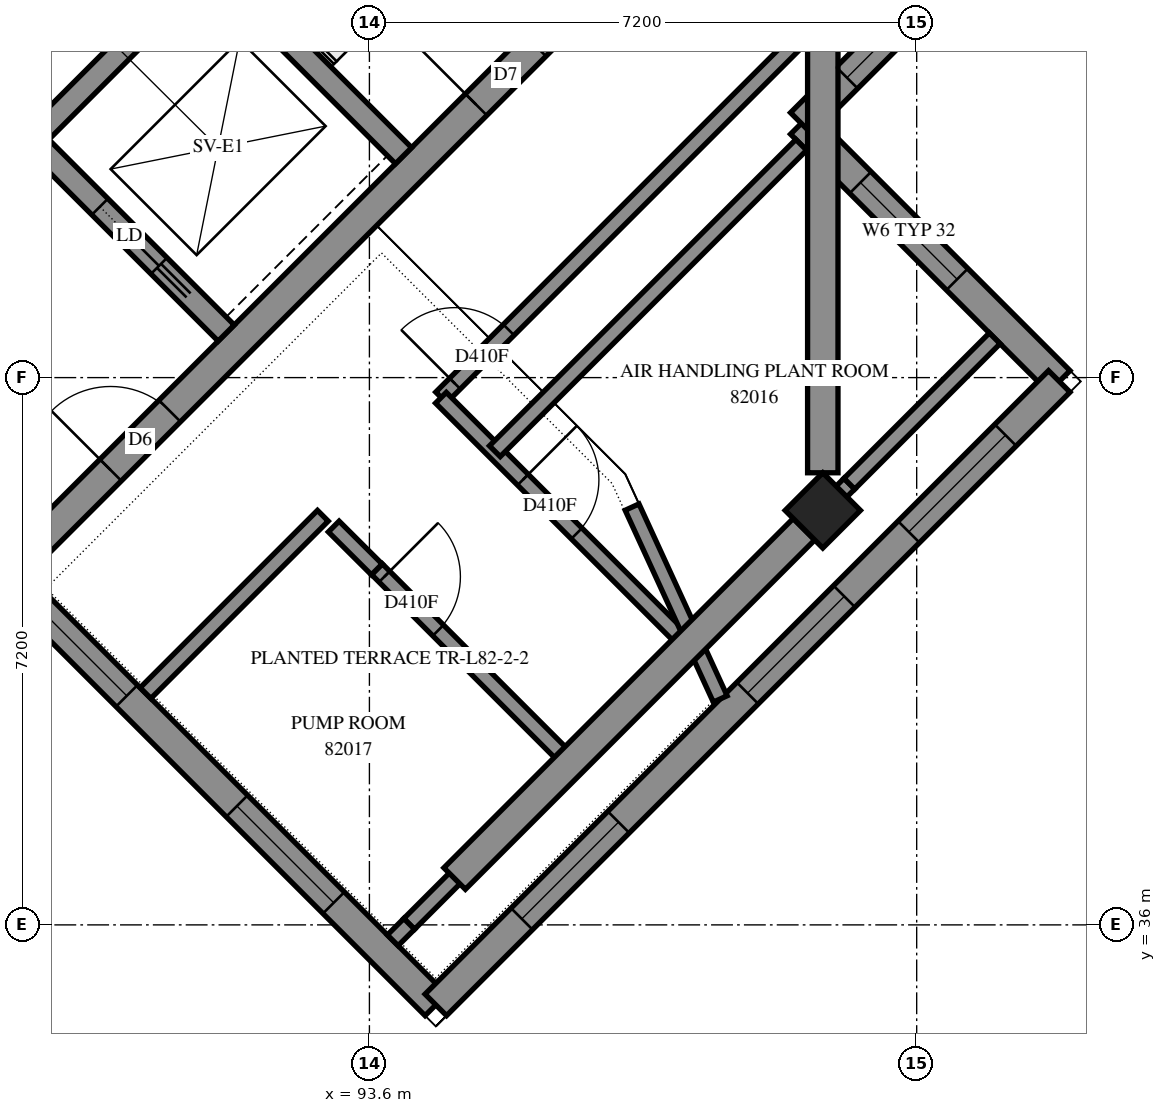
"""IFC4 building model, lengths in metres.
Left out: names, types, materials, properties, quantities, classifications, styles, units other than length and angle.
Written with IfcOpenShell. Run it as: python <this file> out.ifc"""

import sys

from ifc_helpers import new_model, si_unit, direction, frame, frame_2d, origin, origin_2d, place, context, subcontext, project, spatial, polyline, rectangle, outline, extrude, element, fill, save


model = new_model("IFC4")
c1 = context("Model", 3, precision=1e-05, world=origin(), true_north=direction((0.0, 1.0)))
c2 = subcontext(c1, "Body", "Model", "MODEL_VIEW")
j1 = project(units=[si_unit("LENGTHUNIT", "METRE"), si_unit("PLANEANGLEUNIT", "RADIAN")], contexts=[c1])
p1 = place(None, origin())
s1 = spatial("IfcSite", under=j1, at=p1, CompositionType="ELEMENT")
p2 = place(p1, origin())
s2 = spatial("IfcBuilding", under=s1, at=p2, CompositionType="ELEMENT")
p3 = place(p2, frame((0.0, 0.0, 302.0)))
s3 = spatial("IfcBuildingStorey", under=s2, at=p3, CompositionType="ELEMENT", Elevation=302.0)
p4 = place(p3, frame((99.565, 41.453, 0.0), z_axis=(0.0, 0.0, 1.0), x_axis=(0.7071067812, -0.7071067812, 0.0)))
e1 = element("IfcColumn", 1, at=p4, inside=s3, PredefinedType="COLUMN", context=c2, shape_type="SweptSolid", body=[
    extrude(rectangle(XDim=0.7, YDim=0.7, at=origin_2d()), origin(), (0.0, 0.0, 1.0), 3.5),
])
p5 = place(p3, frame((89.17, 40.958, -0.3), z_axis=(0.0, 0.0, 1.0), x_axis=(0.7071067812, 0.7071067812, 0.0)))
e2 = element("IfcWall", 2, at=p5, inside=s3, PredefinedType="SHEAR", context=c2, shape_type="SweptSolid", body=[
    extrude(outline(polyline([(0.0, 0.0), (11.3, 0.0), (11.3, 3.1), (0.0, 3.1), (0.0, 0.0)])), frame((0.0, 0.2, 0.0), z_axis=(0.0, -1.0, 0.0), x_axis=(1.0, 0.0, 0.0)), (0.0, 0.0, 1.0), 0.4),
])
p6 = place(p5, frame((1.45, 0.0, 0.3)))
e3 = element("IfcOpeningElement", 3, at=p6, cuts=e2, PredefinedType="OPENING", context=c2, shape_type="SweptSolid", body=[
    extrude(rectangle(XDim=1.1, YDim=2.1, at=frame_2d((0.55, 1.05))), frame((0.0, 0.21, 0.0), z_axis=(0.0, -1.0, 0.0), x_axis=(1.0, 0.0, 0.0)), (0.0, 0.0, 1.0), 0.42),
])
p7 = place(p5, frame((8.25, 0.0, 0.3)))
e4 = element("IfcOpeningElement", 4, at=p7, cuts=e2, PredefinedType="OPENING", context=c2, shape_type="SweptSolid", body=[
    extrude(rectangle(XDim=1.1, YDim=2.1, at=frame_2d((0.55, 1.05))), frame((0.0, 0.21, 0.0), z_axis=(0.0, -1.0, 0.0), x_axis=(1.0, 0.0, 0.0)), (0.0, 0.0, 1.0), 0.42),
])
p8 = place(p3, frame((89.17, 46.332, 0.0), z_axis=(0.0, 0.0, 1.0), x_axis=(0.7071067812, 0.7071067812, 0.0)))
e5 = element("IfcWall", 5, at=p8, inside=s3, PredefinedType="SOLIDWALL", context=c2, shape_type="SweptSolid", body=[
    extrude(outline(polyline([(0.0, 0.0), (3.3, 0.0), (3.3, 3.5), (0.0, 3.5), (0.0, 0.0)])), frame((0.0, 0.15, 0.0), z_axis=(0.0, -1.0, 0.0), x_axis=(1.0, 0.0, 0.0)), (0.0, 0.0, 1.0), 0.3),
])
p9 = place(p3, frame((81.534, 53.969, 0.0), z_axis=(0.0, 0.0, 1.0), x_axis=(0.707103309, -0.7071102534, 0.0)))
e6 = element("IfcWall", 6, at=p9, inside=s3, PredefinedType="SOLIDWALL", context=c2, shape_type="SweptSolid", body=[
    extrude(outline(polyline([(0.0, 0.0), (14.4, 0.0), (14.4, 3.5), (0.0, 3.5), (0.0, 0.0)])), frame((0.0, 0.15, 0.0), z_axis=(0.0, -1.0, 0.0), x_axis=(1.0, 0.0, 0.0)), (0.0, 0.0, 1.0), 0.3),
])
p10 = place(p9, frame((12.05, 0.0, 0.0)))
e7 = element("IfcOpeningElement", 7, at=p10, cuts=e6, PredefinedType="OPENING", context=c2, shape_type="SweptSolid", body=[
    extrude(rectangle(XDim=1.1, YDim=2.1, at=frame_2d((0.55, 1.05))), frame((0.0, 0.16, 0.0), z_axis=(0.0, -1.0, 0.0), x_axis=(1.0, 0.0, 0.0)), (0.0, 0.0, 1.0), 0.32),
])
p11 = place(p3, frame((88.958, 51.211, 0.0), z_axis=(0.0, 0.0, 1.0), x_axis=(0.7070998367, -0.7071137256, 0.0)))
e8 = element("IfcWall", 8, at=p11, inside=s3, PredefinedType="SOLIDWALL", context=c2, shape_type="SweptSolid", body=[
    extrude(outline(polyline([(0.0, 0.0), (7.2, 0.0), (7.2, 3.5), (0.0, 3.5), (0.0, 0.0)])), frame((0.0, 0.15, 0.0), z_axis=(0.0, -1.0, 0.0), x_axis=(1.0, 0.0, 0.0)), (0.0, 0.0, 1.0), 0.3),
])
p12 = place(p3, frame((102.676, 43.15, 0.0), z_axis=(0.0, 0.0, 1.0), x_axis=(-0.7070963646, 0.7071171977, 0.0)))
e9 = element("IfcWall", 9, at=p12, inside=s3, PredefinedType="SOLIDWALL", context=c2, shape_type="SweptSolid", body=[
    extrude(outline(polyline([(-0.2, -0.2), (4.6, -0.2), (5.0, 0.2), (0.2, 0.2), (-0.2, -0.2)])), origin(), (0.0, 0.0, 1.0), 3.5),
])
p13 = place(p12, frame((1.9, 0.0, 0.7)))
e10 = element("IfcOpeningElement", 10, at=p13, cuts=e9, PredefinedType="OPENING", context=c2, shape_type="SweptSolid", body=[
    extrude(rectangle(XDim=1.8, YDim=2.2, at=frame_2d((0.9, 1.1))), frame((0.0, 0.21, 0.0), z_axis=(0.0, -1.0, 0.0), x_axis=(1.0, 0.0, 0.0)), (0.0, 0.0, 1.0), 0.42),
])
p14 = place(p3, frame((99.282, 46.544, 0.0), z_axis=(0.0, 0.0, 1.0), x_axis=(0.7071067812, 0.7071067812, 0.0)))
e11 = element("IfcWall", 11, at=p14, inside=s3, PredefinedType="SOLIDWALL", context=c2, shape_type="SweptSolid", body=[
    extrude(outline(polyline([(0.2, -0.2), (6.23, -0.2), (5.657, 0.2), (-0.2, 0.2), (0.2, -0.2)])), origin(), (0.0, 0.0, 1.0), 3.5),
])
p15 = place(p14, frame((0.85, 0.0, 0.7)))
e12 = element("IfcOpeningElement", 12, at=p15, cuts=e11, PredefinedType="OPENING", context=c2, shape_type="SweptSolid", body=[
    extrude(rectangle(XDim=1.8, YDim=2.2, at=frame_2d((0.9, 1.1))), frame((0.0, 0.21, 0.0), z_axis=(0.0, -1.0, 0.0), x_axis=(1.0, 0.0, 0.0)), (0.0, 0.0, 1.0), 0.42),
])
p16 = place(p3, frame((72.821, 56.6, 0.0), z_axis=(0.0, 0.0, 1.0), x_axis=(0.7071067812, -0.7071067812, 0.0)))
e13 = element("IfcWall", 13, at=p16, inside=s3, PredefinedType="SOLIDWALL", context=c2, shape_type="SweptSolid", body=[
    extrude(outline(polyline([(0.083, -0.2), (30.821, -0.2), (30.421, 0.2), (-0.083, 0.2), (0.083, -0.2)])), origin(), (0.0, 0.0, 1.0), 3.5),
])
p17 = place(p16, frame((2.421, 0.0, 0.7)))
e14 = element("IfcOpeningElement", 14, at=p17, cuts=e13, PredefinedType="OPENING", context=c2, shape_type="SweptSolid", body=[
    extrude(rectangle(XDim=1.8, YDim=2.2, at=frame_2d((0.9, 1.1))), frame((0.0, 0.21, 0.0), z_axis=(0.0, -1.0, 0.0), x_axis=(1.0, 0.0, 0.0)), (0.0, 0.0, 1.0), 0.42),
])
p18 = place(p16, frame((5.521, 0.0, 0.7)))
e15 = element("IfcOpeningElement", 15, at=p18, cuts=e13, PredefinedType="OPENING", context=c2, shape_type="SweptSolid", body=[
    extrude(rectangle(XDim=1.8, YDim=2.2, at=frame_2d((0.9, 1.1))), frame((0.0, 0.21, 0.0), z_axis=(0.0, -1.0, 0.0), x_axis=(1.0, 0.0, 0.0)), (0.0, 0.0, 1.0), 0.42),
])
p19 = place(p16, frame((8.921, 0.0, 0.7)))
e16 = element("IfcOpeningElement", 16, at=p19, cuts=e13, PredefinedType="OPENING", context=c2, shape_type="SweptSolid", body=[
    extrude(rectangle(XDim=1.8, YDim=2.2, at=frame_2d((0.9, 1.1))), frame((0.0, 0.21, 0.0), z_axis=(0.0, -1.0, 0.0), x_axis=(1.0, 0.0, 0.0)), (0.0, 0.0, 1.0), 0.42),
])
p20 = place(p16, frame((12.521, 0.0, 0.7)))
e17 = element("IfcOpeningElement", 17, at=p20, cuts=e13, PredefinedType="OPENING", context=c2, shape_type="SweptSolid", body=[
    extrude(rectangle(XDim=1.8, YDim=2.2, at=frame_2d((0.9, 1.1))), frame((0.0, 0.21, 0.0), z_axis=(0.0, -1.0, 0.0), x_axis=(1.0, 0.0, 0.0)), (0.0, 0.0, 1.0), 0.42),
])
p21 = place(p16, frame((16.121, 0.0, 0.7)))
e18 = element("IfcOpeningElement", 18, at=p21, cuts=e13, PredefinedType="OPENING", context=c2, shape_type="SweptSolid", body=[
    extrude(rectangle(XDim=1.8, YDim=2.2, at=frame_2d((0.9, 1.1))), frame((0.0, 0.21, 0.0), z_axis=(0.0, -1.0, 0.0), x_axis=(1.0, 0.0, 0.0)), (0.0, 0.0, 1.0), 0.42),
])
p22 = place(p16, frame((19.721, 0.0, 0.7)))
e19 = element("IfcOpeningElement", 19, at=p22, cuts=e13, PredefinedType="OPENING", context=c2, shape_type="SweptSolid", body=[
    extrude(rectangle(XDim=1.8, YDim=2.2, at=frame_2d((0.9, 1.1))), frame((0.0, 0.21, 0.0), z_axis=(0.0, -1.0, 0.0), x_axis=(1.0, 0.0, 0.0)), (0.0, 0.0, 1.0), 0.42),
])
p23 = place(p16, frame((23.071, 0.0, 0.7)))
e20 = element("IfcOpeningElement", 20, at=p23, cuts=e13, PredefinedType="OPENING", context=c2, shape_type="SweptSolid", body=[
    extrude(rectangle(XDim=1.8, YDim=2.2, at=frame_2d((0.9, 1.1))), frame((0.0, 0.21, 0.0), z_axis=(0.0, -1.0, 0.0), x_axis=(1.0, 0.0, 0.0)), (0.0, 0.0, 1.0), 0.42),
])
p24 = place(p16, frame((26.921, 0.0, 0.7)))
e21 = element("IfcOpeningElement", 21, at=p24, cuts=e13, PredefinedType="OPENING", context=c2, shape_type="SweptSolid", body=[
    extrude(rectangle(XDim=1.8, YDim=2.2, at=frame_2d((0.9, 1.1))), frame((0.0, 0.21, 0.0), z_axis=(0.0, -1.0, 0.0), x_axis=(1.0, 0.0, 0.0)), (0.0, 0.0, 1.0), 0.42),
])
p25 = place(p3, frame((94.474, 34.948, 0.0), z_axis=(0.0, 0.0, 1.0), x_axis=(0.7071110915, 0.7071024708, 0.0)))
e22 = element("IfcWall", 22, at=p25, inside=s3, PredefinedType="SOLIDWALL", context=c2, shape_type="SweptSolid", body=[
    extrude(outline(polyline([(-0.2, -0.2), (11.8, -0.2), (11.4, 0.2), (0.2, 0.2), (-0.2, -0.2)])), origin(), (0.0, 0.0, 1.0), 3.5),
])
p26 = place(p25, frame((1.6, 0.0, 0.7)))
e23 = element("IfcOpeningElement", 23, at=p26, cuts=e22, PredefinedType="OPENING", context=c2, shape_type="SweptSolid", body=[
    extrude(rectangle(XDim=1.8, YDim=2.2, at=frame_2d((0.9, 1.1))), frame((0.0, 0.21, 0.0), z_axis=(0.0, -1.0, 0.0), x_axis=(1.0, 0.0, 0.0)), (0.0, 0.0, 1.0), 0.42),
])
p27 = place(p25, frame((5.8, 0.0, 0.7)))
e24 = element("IfcOpeningElement", 24, at=p27, cuts=e22, PredefinedType="OPENING", context=c2, shape_type="SweptSolid", body=[
    extrude(rectangle(XDim=1.8, YDim=2.2, at=frame_2d((0.9, 1.1))), frame((0.0, 0.21, 0.0), z_axis=(0.0, -1.0, 0.0), x_axis=(1.0, 0.0, 0.0)), (0.0, 0.0, 1.0), 0.42),
])
p28 = place(p25, frame((8.8, 0.0, 0.7)))
e25 = element("IfcOpeningElement", 25, at=p28, cuts=e22, PredefinedType="OPENING", context=c2, shape_type="SweptSolid", body=[
    extrude(rectangle(XDim=1.8, YDim=2.2, at=frame_2d((0.9, 1.1))), frame((0.0, 0.21, 0.0), z_axis=(0.0, -1.0, 0.0), x_axis=(1.0, 0.0, 0.0)), (0.0, 0.0, 1.0), 0.42),
])
p29 = place(p3, frame((94.543, 42.939, 0.0), z_axis=(0.0, 0.0, 1.0), x_axis=(0.7071067812, 0.7071067812, 0.0)))
e26 = element("IfcWall", 26, at=p29, inside=s3, PredefinedType="PARTITIONING", context=c2, shape_type="SweptSolid", body=[
    extrude(rectangle(XDim=8.7, YDim=0.2, at=frame_2d((4.35, 0.0))), origin(), (0.0, 0.0, 1.0), 3.5),
])
p30 = place(p29, frame((0.258, 0.0, 0.0)))
e27 = element("IfcOpeningElement", 27, at=p30, cuts=e26, PredefinedType="OPENING", context=c2, shape_type="SweptSolid", body=[
    extrude(rectangle(XDim=1.0, YDim=2.1, at=frame_2d((0.5, 1.05))), frame((0.0, 0.11, 0.0), z_axis=(0.0, -1.0, 0.0), x_axis=(1.0, 0.0, 0.0)), (0.0, 0.0, 1.0), 0.22),
])
p31 = place(p3, frame((94.541, 42.935, 0.0), z_axis=(0.0, 0.0, 1.0), x_axis=(0.7071067812, -0.7071067812, 0.0)))
e28 = element("IfcWall", 28, at=p31, inside=s3, PredefinedType="PARTITIONING", context=c2, shape_type="SweptSolid", body=[
    extrude(rectangle(XDim=4.599, YDim=0.2, at=frame_2d((2.3, 0.0))), origin(), (0.0, 0.0, 1.0), 3.5),
])
p32 = place(p31, frame((1.525, 0.0, 0.0)))
e29 = element("IfcOpeningElement", 29, at=p32, cuts=e28, PredefinedType="OPENING", context=c2, shape_type="SweptSolid", body=[
    extrude(rectangle(XDim=1.0, YDim=2.1, at=frame_2d((0.5, 1.05))), frame((0.0, 0.11, 0.0), z_axis=(0.0, -1.0, 0.0), x_axis=(1.0, 0.0, 0.0)), (0.0, 0.0, 1.0), 0.22),
])
p33 = place(p3, frame((93.699, 40.679, 0.0), z_axis=(0.0, 0.0, 1.0), x_axis=(0.7071067812, -0.7071067812, 0.0)))
e30 = element("IfcWall", 30, at=p33, inside=s3, PredefinedType="PARTITIONING", context=c2, shape_type="SweptSolid", body=[
    extrude(rectangle(XDim=3.601, YDim=0.2, at=frame_2d((1.8, 0.0))), origin(), (0.0, 0.0, 1.0), 3.5),
])
p34 = place(p33, frame((0.139, 0.0, 0.0)))
e31 = element("IfcOpeningElement", 31, at=p34, cuts=e30, PredefinedType="OPENING", context=c2, shape_type="SweptSolid", body=[
    extrude(rectangle(XDim=1.0, YDim=2.1, at=frame_2d((0.5, 1.05))), frame((0.0, 0.11, 0.0), z_axis=(0.0, -1.0, 0.0), x_axis=(1.0, 0.0, 0.0)), (0.0, 0.0, 1.0), 0.22),
])
p35 = place(p3, frame((90.654, 39.05, 0.0), z_axis=(0.0, 0.0, 1.0), x_axis=(0.7071067812, 0.7071067812, 0.0)))
e32 = element("IfcWall", 32, at=p35, inside=s3, PredefinedType="PARTITIONING", context=c2, shape_type="SweptSolid", body=[
    extrude(rectangle(XDim=3.299, YDim=0.2, at=frame_2d((1.65, 0.0))), origin(), (0.0, 0.0, 1.0), 3.5),
])
p36 = place(p3, frame((96.24, 38.132, 0.0), z_axis=(0.0, 0.0, 1.0), x_axis=(0.706651904, 0.7075613659, 0.0)))
e33 = element("IfcWall", 33, at=p36, inside=s3, PredefinedType="PARTITIONING", context=c2, shape_type="SweptSolid", body=[
    extrude(rectangle(XDim=2.199, YDim=0.2, at=frame_2d((1.1, 0.0))), origin(), (0.0, 0.0, 1.0), 3.5),
])
for number, where, z_axis, x_axis in (
    (34, (94.123, 36.013, 0.0), (0.0, 0.0, 1.0), (0.707, 0.707, 0.0)),
    (35, (97.796, 39.686, 0.0), (0.0, 0.0, 1.0), (0.707, 0.707, 0.0)),
):
    element("IfcWall", number, at=place(p3, frame(where, z_axis=z_axis, x_axis=x_axis)), inside=s3, PredefinedType="PARTITIONING", context=c2, shape_type="SweptSolid", body=[
        extrude(rectangle(XDim=2.995, YDim=0.2, at=frame_2d((1.498, 0.0))), origin(), (0.0, 0.0, 1.0), 3.5),
    ])
p37 = place(p3, frame((93.131, 41.241, 0.0), z_axis=(0.0, 0.0, 1.0), x_axis=(0.7083571881, -0.7058541592, 0.0)))
e36 = element("IfcWall", 36, at=p37, inside=s3, PredefinedType="PARTITIONING", context=c2, shape_type="SweptSolid", body=[
    extrude(rectangle(XDim=0.799, YDim=0.2, at=frame_2d((0.4, 0.0))), origin(), (0.0, 0.0, 1.0), 3.5),
])
p38 = place(p3, frame((98.215, 38.972, 0.0), z_axis=(0.0, 0.0, 1.0), x_axis=(-0.4174664315, 0.9086923454, 0.0)))
e37 = element("IfcWall", 37, at=p38, inside=s3, PredefinedType="PARAPET", context=c2, shape_type="SweptSolid", body=[
    extrude(outline(polyline([(0.0, -0.1), (2.778, -0.1), (2.778, 0.1), (0.0, 0.1), (0.0, -0.1)])), origin(), (0.0, 0.0, 1.0), 0.25),
])
p39 = place(p3, frame((95.25, 42.232, 0.0), z_axis=(0.0, 0.0, 1.0), x_axis=(0.7071067812, 0.7071067812, 0.0)))
e38 = element("IfcWall", 38, at=p39, inside=s3, PredefinedType="PARTITIONING", context=c2, shape_type="SweptSolid", body=[
    extrude(outline(polyline([(0.0, -0.1), (5.7, -0.1), (5.7, 0.1), (0.0, 0.1), (0.0, -0.1)])), origin(), (0.0, 0.0, 1.0), 3.5),
])
p40 = place(p3, frame((99.914, 41.804, 0.0), z_axis=(0.0, 0.0, 1.0), x_axis=(0.7071067812, 0.7071067812, 0.0)))
e39 = element("IfcWall", 39, at=p40, inside=s3, PredefinedType="PARTITIONING", context=c2, shape_type="SweptSolid", body=[
    extrude(outline(polyline([(0.0, -0.1), (2.705, -0.1), (2.705, 0.1), (0.0, 0.1), (0.0, -0.1)])), origin(), (0.0, 0.0, 1.0), 3.5),
])
p41 = place(p3, frame((93.907, 35.797, 0.0), z_axis=(0.0, 0.0, 1.0), x_axis=(0.7071067812, 0.7071067812, 0.0)))
e40 = element("IfcWall", 40, at=p41, inside=s3, PredefinedType="PARTITIONING", context=c2, shape_type="SweptSolid", body=[
    extrude(outline(polyline([(0.0, -0.1), (0.305, -0.1), (0.305, 0.1), (0.0, 0.1), (0.0, -0.1)])), origin(), (0.0, 0.0, 1.0), 3.5),
])
p42 = place(p13, origin())
e41 = element("IfcWindow", 41, at=p42, inside=s3, PartitioningType="SINGLE_PANEL", PredefinedType="WINDOW", context=c2, shape_type="SweptSolid", body=[
    extrude(rectangle(XDim=1.8, YDim=2.2, at=frame_2d((0.9, 1.1))), frame((0.0, 0.08, 0.0), z_axis=(0.0, -1.0, 0.0), x_axis=(1.0, 0.0, 0.0)), (0.0, 0.0, 1.0), 0.06),
])
fill(e10, e41)
p43 = place(p15, origin())
e42 = element("IfcWindow", 42, at=p43, inside=s3, PartitioningType="SINGLE_PANEL", PredefinedType="WINDOW", context=c2, shape_type="SweptSolid", body=[
    extrude(rectangle(XDim=1.8, YDim=2.2, at=frame_2d((0.9, 1.1))), frame((0.0, 0.08, 0.0), z_axis=(0.0, -1.0, 0.0), x_axis=(1.0, 0.0, 0.0)), (0.0, 0.0, 1.0), 0.06),
])
fill(e12, e42)
p44 = place(p23, origin())
e43 = element("IfcWindow", 43, at=p44, inside=s3, PartitioningType="SINGLE_PANEL", PredefinedType="WINDOW", context=c2, shape_type="SweptSolid", body=[
    extrude(rectangle(XDim=1.8, YDim=2.2, at=frame_2d((0.9, 1.1))), frame((0.0, 0.08, 0.0), z_axis=(0.0, -1.0, 0.0), x_axis=(1.0, 0.0, 0.0)), (0.0, 0.0, 1.0), 0.06),
])
fill(e20, e43)
p45 = place(p24, origin())
e44 = element("IfcWindow", 44, at=p45, inside=s3, PartitioningType="SINGLE_PANEL", PredefinedType="WINDOW", context=c2, shape_type="SweptSolid", body=[
    extrude(rectangle(XDim=1.8, YDim=2.2, at=frame_2d((0.9, 1.1))), frame((0.0, 0.08, 0.0), z_axis=(0.0, -1.0, 0.0), x_axis=(1.0, 0.0, 0.0)), (0.0, 0.0, 1.0), 0.06),
])
fill(e21, e44)
p46 = place(p26, origin())
e45 = element("IfcWindow", 45, at=p46, inside=s3, PartitioningType="SINGLE_PANEL", PredefinedType="WINDOW", context=c2, shape_type="SweptSolid", body=[
    extrude(rectangle(XDim=1.8, YDim=2.2, at=frame_2d((0.9, 1.1))), frame((0.0, 0.08, 0.0), z_axis=(0.0, -1.0, 0.0), x_axis=(1.0, 0.0, 0.0)), (0.0, 0.0, 1.0), 0.06),
])
fill(e23, e45)
p47 = place(p27, origin())
e46 = element("IfcWindow", 46, at=p47, inside=s3, PartitioningType="SINGLE_PANEL", PredefinedType="WINDOW", context=c2, shape_type="SweptSolid", body=[
    extrude(rectangle(XDim=1.8, YDim=2.2, at=frame_2d((0.9, 1.1))), frame((0.0, 0.08, 0.0), z_axis=(0.0, -1.0, 0.0), x_axis=(1.0, 0.0, 0.0)), (0.0, 0.0, 1.0), 0.06),
])
fill(e24, e46)
p48 = place(p28, origin())
e47 = element("IfcWindow", 47, at=p48, inside=s3, PartitioningType="SINGLE_PANEL", PredefinedType="WINDOW", context=c2, shape_type="SweptSolid", body=[
    extrude(rectangle(XDim=1.8, YDim=2.2, at=frame_2d((0.9, 1.1))), frame((0.0, 0.08, 0.0), z_axis=(0.0, -1.0, 0.0), x_axis=(1.0, 0.0, 0.0)), (0.0, 0.0, 1.0), 0.06),
])
fill(e25, e47)
p49 = place(p6, origin())
e48 = element("IfcDoor", 48, at=p49, inside=s3, OperationType="DOUBLE_DOOR_SINGLE_SWING", PredefinedType="DOOR", context=c2, shape_type="SweptSolid", body=[
    extrude(rectangle(XDim=1.1, YDim=2.1, at=frame_2d((0.55, 1.05))), frame((0.0, 0.025, 0.0), z_axis=(0.0, -1.0, 0.0), x_axis=(1.0, 0.0, 0.0)), (0.0, 0.0, 1.0), 0.05),
])
fill(e3, e48)
p50 = place(p7, origin())
e49 = element("IfcDoor", 49, at=p50, inside=s3, OperationType="SINGLE_SWING_RIGHT", PredefinedType="DOOR", context=c2, shape_type="SweptSolid", body=[
    extrude(rectangle(XDim=1.1, YDim=2.1, at=frame_2d((0.55, 1.05))), frame((0.0, 0.025, 0.0), z_axis=(0.0, -1.0, 0.0), x_axis=(1.0, 0.0, 0.0)), (0.0, 0.0, 1.0), 0.05),
])
fill(e4, e49)
p51 = place(p10, origin())
e50 = element("IfcDoor", 50, at=p51, inside=s3, OperationType="SLIDING_TO_RIGHT", PredefinedType="DOOR", context=c2, shape_type="SweptSolid", body=[
    extrude(rectangle(XDim=1.1, YDim=2.1, at=frame_2d((0.55, 1.05))), frame((0.0, 0.025, 0.0), z_axis=(0.0, -1.0, 0.0), x_axis=(1.0, 0.0, 0.0)), (0.0, 0.0, 1.0), 0.05),
])
fill(e7, e50)
p52 = place(p30, origin())
e51 = element("IfcDoor", 51, at=p52, inside=s3, OperationType="SINGLE_SWING_LEFT", PredefinedType="DOOR", context=c2, shape_type="SweptSolid", body=[
    extrude(rectangle(XDim=1.0, YDim=2.1, at=frame_2d((0.5, 1.05))), frame((0.0, 0.025, 0.0), z_axis=(0.0, -1.0, 0.0), x_axis=(1.0, 0.0, 0.0)), (0.0, 0.0, 1.0), 0.05),
])
fill(e27, e51)
p53 = place(p32, origin())
e52 = element("IfcDoor", 52, at=p53, inside=s3, OperationType="SINGLE_SWING_RIGHT", PredefinedType="DOOR", context=c2, shape_type="SweptSolid", body=[
    extrude(rectangle(XDim=1.0, YDim=2.1, at=frame_2d((0.5, 1.05))), frame((0.0, 0.025, 0.0), z_axis=(0.0, -1.0, 0.0), x_axis=(1.0, 0.0, 0.0)), (0.0, 0.0, 1.0), 0.05),
])
fill(e29, e52)
p54 = place(p34, origin())
e53 = element("IfcDoor", 53, at=p54, inside=s3, OperationType="SINGLE_SWING_LEFT", PredefinedType="DOOR", context=c2, shape_type="SweptSolid", body=[
    extrude(rectangle(XDim=1.0, YDim=2.1, at=frame_2d((0.5, 1.05))), frame((0.0, 0.025, 0.0), z_axis=(0.0, -1.0, 0.0), x_axis=(1.0, 0.0, 0.0)), (0.0, 0.0, 1.0), 0.05),
])
fill(e31, e53)
save(model, sys.argv[1])
